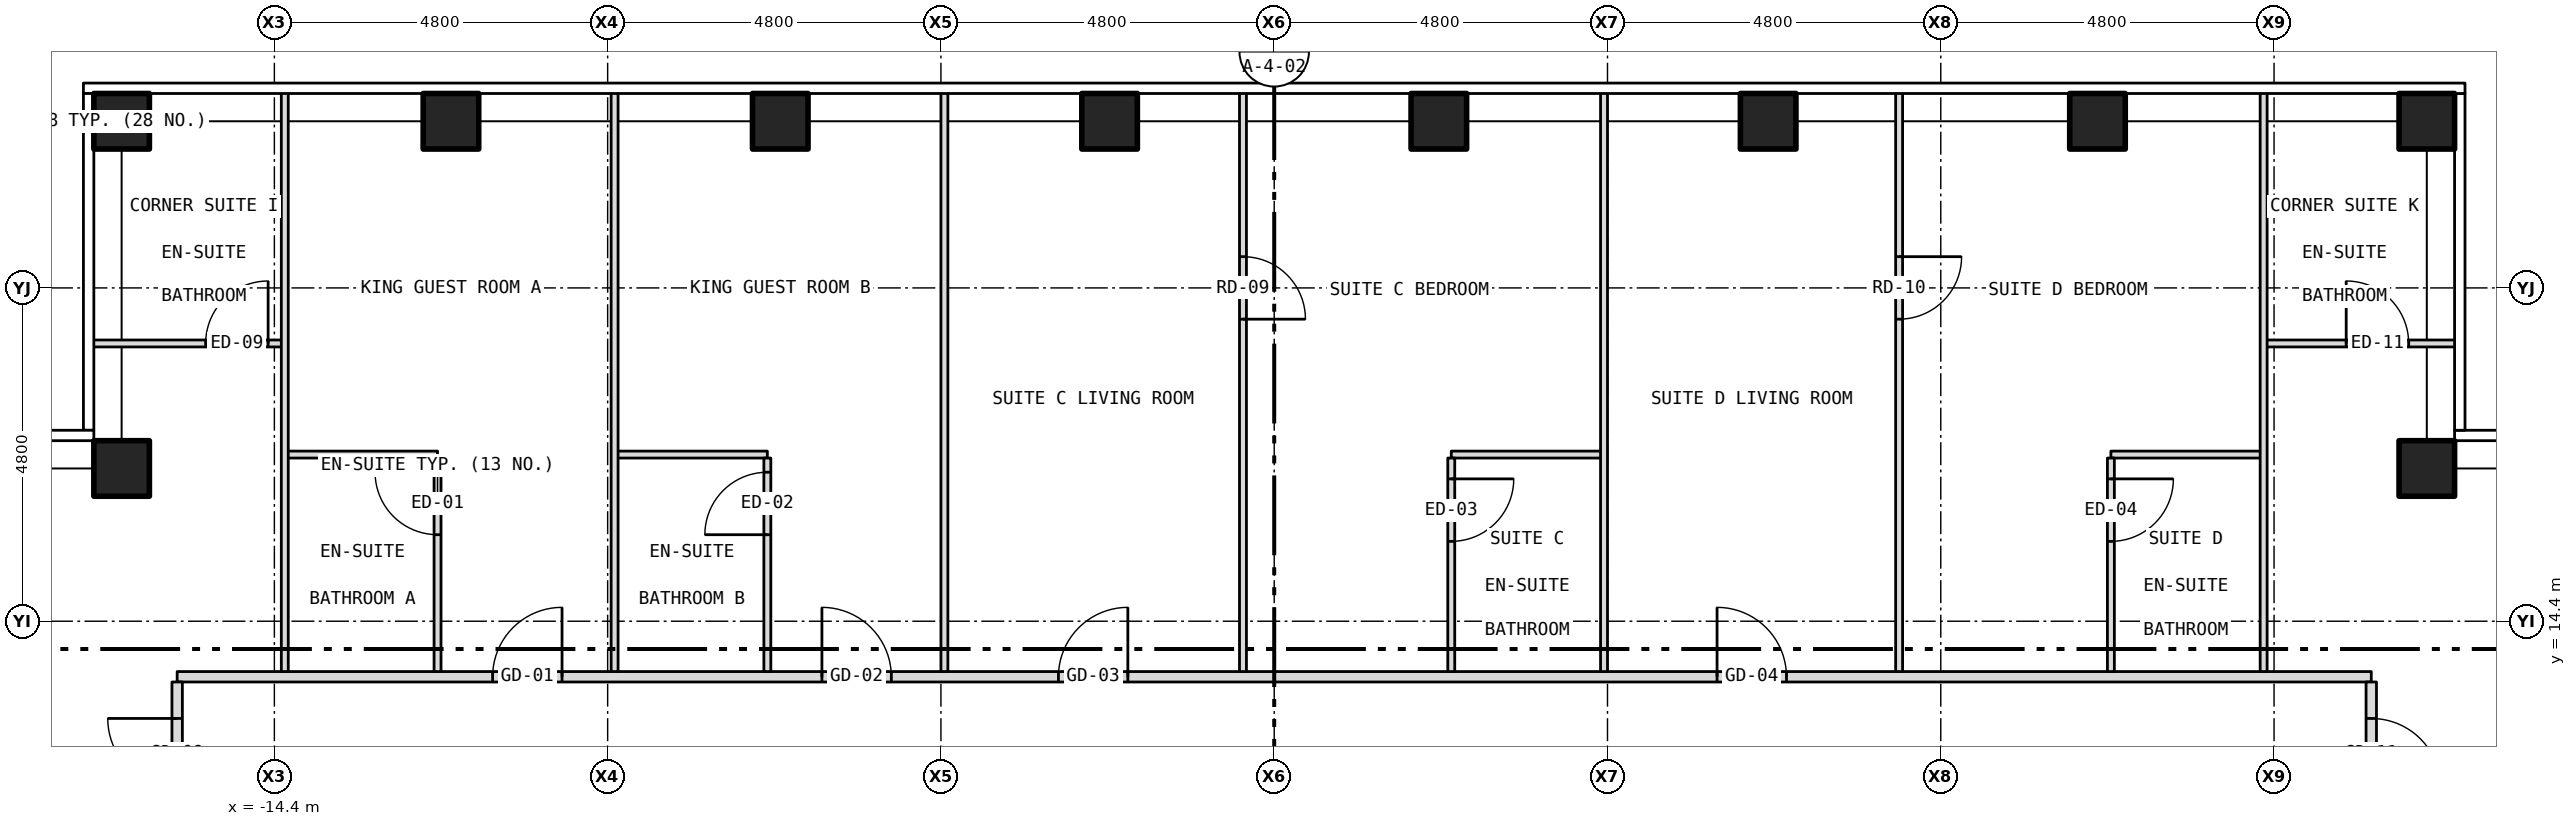
"""IFC4 building model, lengths in metres.
Left out: names, types, materials, properties, quantities, classifications, styles, units other than length and angle.
Written with IfcOpenShell. Run it as: python <this file> out.ifc"""

import sys

from ifc_helpers import new_model, si_unit, direction, frame, frame_2d, origin, origin_2d, place, context, subcontext, project, spatial, rectangle, hollow_rectangle, extrude, element, fill, save


model = new_model("IFC4")
c1 = context("Model", 3, precision=1e-05, world=origin(), true_north=direction((0.0, 1.0)))
c2 = subcontext(c1, "Body", "Model", "MODEL_VIEW")
j1 = project(units=[si_unit("LENGTHUNIT", "METRE"), si_unit("PLANEANGLEUNIT", "RADIAN")], contexts=[c1])
p1 = place(None, origin())
s1 = spatial("IfcSite", under=j1, at=p1, CompositionType="ELEMENT")
p2 = place(p1, origin())
s2 = spatial("IfcBuilding", under=s1, at=p2, CompositionType="ELEMENT")
p3 = place(p2, frame((0.0, 0.0, 169.0)))
s3 = spatial("IfcBuildingStorey", under=s2, at=p3, CompositionType="ELEMENT", Elevation=169.0)
for number, where, z_axis, x_axis in (
    (1, (-16.6, 21.6, -0.15), (0.0, 0.0, 1.0), (1.0, 0.0, 0.0)),
    (2, (-11.857, 21.6, -0.15), (0.0, 0.0, 1.0), (1.0, 0.0, 0.0)),
    (3, (-7.114, 21.6, -0.15), (0.0, 0.0, 1.0), (1.0, 0.0, 0.0)),
    (4, (-2.371, 21.6, -0.15), (0.0, 0.0, 1.0), (1.0, 0.0, 0.0)),
    (5, (2.371, 21.6, -0.15), (0.0, 0.0, 1.0), (1.0, 0.0, 0.0)),
    (6, (7.114, 21.6, -0.15), (0.0, 0.0, 1.0), (1.0, 0.0, 0.0)),
    (7, (11.857, 21.6, -0.15), (0.0, 0.0, 1.0), (1.0, 0.0, 0.0)),
    (8, (16.6, 21.6, -0.15), (0.0, 0.0, 1.0), (1.0, 0.0, 0.0)),
    (9, (-16.6, 16.6, -0.15), (0.0, 0.0, 1.0), (1.0, 0.0, 0.0)),
    (10, (16.6, 16.6, -0.15), (0.0, 0.0, 1.0), (1.0, 0.0, 0.0)),
):
    element("IfcColumn", number, at=place(p3, frame(where, z_axis=z_axis, x_axis=x_axis)), inside=s3, PredefinedType="COLUMN", context=c2, shape_type="SweptSolid", body=[
        extrude(hollow_rectangle(XDim=0.8, YDim=0.8, WallThickness=0.045, at=origin_2d()), origin(), (0.0, 0.0, 1.0), 3.5),
    ])
p4 = place(p3, frame((-15.8, 13.6, 0.0), z_axis=(0.0, 0.0, 1.0), x_axis=(1.0, 0.0, 0.0)))
e11 = element("IfcWall", 11, at=p4, inside=s3, PredefinedType="PARTITIONING", context=c2, shape_type="SweptSolid", body=[
    extrude(rectangle(XDim=31.6, YDim=0.15, at=frame_2d((15.8, 0.0))), origin(), (0.0, 0.0, 1.0), 3.35),
])
p5 = place(p4, frame((4.543, 0.0, 0.0)))
e12 = element("IfcOpeningElement", 12, at=p5, cuts=e11, PredefinedType="OPENING", context=c2, shape_type="SweptSolid", body=[
    extrude(rectangle(XDim=1.0, YDim=2.1, at=frame_2d((0.5, 1.05))), frame((0.0, 0.087, 0.0), z_axis=(0.0, -1.0, 0.0), x_axis=(1.0, 0.0, 0.0)), (0.0, 0.0, 1.0), 0.174),
])
p6 = place(p4, frame((9.286, 0.0, 0.0)))
e13 = element("IfcOpeningElement", 13, at=p6, cuts=e11, PredefinedType="OPENING", context=c2, shape_type="SweptSolid", body=[
    extrude(rectangle(XDim=1.0, YDim=2.1, at=frame_2d((0.5, 1.05))), frame((0.0, 0.087, 0.0), z_axis=(0.0, -1.0, 0.0), x_axis=(1.0, 0.0, 0.0)), (0.0, 0.0, 1.0), 0.174),
])
p7 = place(p4, frame((12.692, 0.0, 0.0)))
e14 = element("IfcOpeningElement", 14, at=p7, cuts=e11, PredefinedType="OPENING", context=c2, shape_type="SweptSolid", body=[
    extrude(rectangle(XDim=1.0, YDim=2.1, at=frame_2d((0.5, 1.05))), frame((0.0, 0.087, 0.0), z_axis=(0.0, -1.0, 0.0), x_axis=(1.0, 0.0, 0.0)), (0.0, 0.0, 1.0), 0.174),
])
p8 = place(p4, frame((22.178, 0.0, 0.0)))
e15 = element("IfcOpeningElement", 15, at=p8, cuts=e11, PredefinedType="OPENING", context=c2, shape_type="SweptSolid", body=[
    extrude(rectangle(XDim=1.0, YDim=2.1, at=frame_2d((0.5, 1.05))), frame((0.0, 0.087, 0.0), z_axis=(0.0, -1.0, 0.0), x_axis=(1.0, 0.0, 0.0)), (0.0, 0.0, 1.0), 0.174),
])
for number, where, z_axis, x_axis in (
    (16, (-14.25, 16.8, 0.0), (0.0, 0.0, 1.0), (1.0, 0.0, 0.0)),
    (17, (-9.5, 16.8, 0.0), (0.0, 0.0, 1.0), (1.0, 0.0, 0.0)),
    (18, (2.55, 16.8, 0.0), (0.0, 0.0, 1.0), (1.0, 0.0, 0.0)),
    (19, (12.05, 16.8, 0.0), (0.0, 0.0, 1.0), (1.0, 0.0, 0.0)),
):
    element("IfcWall", number, at=place(p3, frame(where, z_axis=z_axis, x_axis=x_axis)), inside=s3, PredefinedType="PARTITIONING", context=c2, shape_type="SweptSolid", body=[
        extrude(rectangle(XDim=2.2, YDim=0.1, at=frame_2d((1.1, 0.0))), origin(), (0.0, 0.0, 1.0), 3.35),
    ])
p9 = place(p3, frame((-17.03, 18.4, 0.0), z_axis=(0.0, 0.0, 1.0), x_axis=(1.0, 0.0, 0.0)))
e20 = element("IfcWall", 20, at=p9, inside=s3, PredefinedType="PARTITIONING", context=c2, shape_type="SweptSolid", body=[
    extrude(rectangle(XDim=2.78, YDim=0.1, at=frame_2d((1.39, 0.0))), origin(), (0.0, 0.0, 1.0), 3.35),
])
p10 = place(p9, frame((1.64, 0.0, 0.0)))
e21 = element("IfcOpeningElement", 21, at=p10, cuts=e20, PredefinedType="OPENING", context=c2, shape_type="SweptSolid", body=[
    extrude(rectangle(XDim=0.9, YDim=2.1, at=frame_2d((0.45, 1.05))), frame((0.0, 0.062, 0.0), z_axis=(0.0, -1.0, 0.0), x_axis=(1.0, 0.0, 0.0)), (0.0, 0.0, 1.0), 0.124),
])
p11 = place(p3, frame((14.25, 18.4, 0.0), z_axis=(0.0, 0.0, 1.0), x_axis=(1.0, 0.0, 0.0)))
e22 = element("IfcWall", 22, at=p11, inside=s3, PredefinedType="PARTITIONING", context=c2, shape_type="SweptSolid", body=[
    extrude(rectangle(XDim=2.78, YDim=0.1, at=frame_2d((1.39, 0.0))), origin(), (0.0, 0.0, 1.0), 3.35),
])
p12 = place(p11, frame((1.189, 0.0, 0.0)))
e23 = element("IfcOpeningElement", 23, at=p12, cuts=e22, PredefinedType="OPENING", context=c2, shape_type="SweptSolid", body=[
    extrude(rectangle(XDim=0.9, YDim=2.1, at=frame_2d((0.45, 1.05))), frame((0.0, 0.062, 0.0), z_axis=(0.0, -1.0, 0.0), x_axis=(1.0, 0.0, 0.0)), (0.0, 0.0, 1.0), 0.124),
])
p13 = place(p3, frame((-15.8, 10.92, 0.0), z_axis=(0.0, 0.0, 1.0), x_axis=(0.0, 1.0, 0.0)))
e24 = element("IfcWall", 24, at=p13, inside=s3, PredefinedType="PARTITIONING", context=c2, shape_type="SweptSolid", body=[
    extrude(rectangle(XDim=2.605, YDim=0.15, at=frame_2d((1.302, 0.0))), origin(), (0.0, 0.0, 1.0), 3.35),
])
p14 = place(p13, frame((1.08, 0.0, 0.0)))
e25 = element("IfcOpeningElement", 25, at=p14, cuts=e24, PredefinedType="OPENING", context=c2, shape_type="SweptSolid", body=[
    extrude(rectangle(XDim=1.0, YDim=2.1, at=frame_2d((0.5, 1.05))), frame((0.0, 0.087, 0.0), z_axis=(0.0, -1.0, 0.0), x_axis=(1.0, 0.0, 0.0)), (0.0, 0.0, 1.0), 0.174),
])
p15 = place(p3, frame((-14.25, 13.675, 0.0), z_axis=(0.0, 0.0, 1.0), x_axis=(0.0, 1.0, 0.0)))
e26 = element("IfcWall", 26, at=p15, inside=s3, PredefinedType="PARTITIONING", context=c2, shape_type="SweptSolid", body=[
    extrude(rectangle(XDim=8.355, YDim=0.1, at=frame_2d((4.177, 0.0))), origin(), (0.0, 0.0, 1.0), 2.817),
])
p16 = place(p3, frame((-12.05, 13.675, 0.0), z_axis=(0.0, 0.0, 1.0), x_axis=(0.0, 1.0, 0.0)))
e27 = element("IfcWall", 27, at=p16, inside=s3, PredefinedType="PARTITIONING", context=c2, shape_type="SweptSolid", body=[
    extrude(rectangle(XDim=3.075, YDim=0.1, at=frame_2d((1.538, 0.0))), origin(), (0.0, 0.0, 1.0), 3.35),
])
p17 = place(p16, frame((1.971, 0.0, 0.0)))
e28 = element("IfcOpeningElement", 28, at=p17, cuts=e27, PredefinedType="OPENING", context=c2, shape_type="SweptSolid", body=[
    extrude(rectangle(XDim=0.9, YDim=2.1, at=frame_2d((0.45, 1.05))), frame((0.0, 0.062, 0.0), z_axis=(0.0, -1.0, 0.0), x_axis=(1.0, 0.0, 0.0)), (0.0, 0.0, 1.0), 0.124),
])
p18 = place(p3, frame((-9.5, 13.675, 0.0), z_axis=(0.0, 0.0, 1.0), x_axis=(0.0, 1.0, 0.0)))
e29 = element("IfcWall", 29, at=p18, inside=s3, PredefinedType="PARTITIONING", context=c2, shape_type="SweptSolid", body=[
    extrude(rectangle(XDim=8.355, YDim=0.1, at=frame_2d((4.177, 0.0))), origin(), (0.0, 0.0, 1.0), 2.728),
])
p19 = place(p3, frame((-7.3, 13.675, 0.0), z_axis=(0.0, 0.0, 1.0), x_axis=(0.0, 1.0, 0.0)))
e30 = element("IfcWall", 30, at=p19, inside=s3, PredefinedType="PARTITIONING", context=c2, shape_type="SweptSolid", body=[
    extrude(rectangle(XDim=3.075, YDim=0.1, at=frame_2d((1.538, 0.0))), origin(), (0.0, 0.0, 1.0), 3.35),
])
p20 = place(p19, frame((1.971, 0.0, 0.0)))
e31 = element("IfcOpeningElement", 31, at=p20, cuts=e30, PredefinedType="OPENING", context=c2, shape_type="SweptSolid", body=[
    extrude(rectangle(XDim=0.9, YDim=2.1, at=frame_2d((0.45, 1.05))), frame((0.0, 0.062, 0.0), z_axis=(0.0, -1.0, 0.0), x_axis=(1.0, 0.0, 0.0)), (0.0, 0.0, 1.0), 0.124),
])
p21 = place(p3, frame((-4.75, 13.675, 0.0), z_axis=(0.0, 0.0, 1.0), x_axis=(0.0, 1.0, 0.0)))
e32 = element("IfcWall", 32, at=p21, inside=s3, PredefinedType="PARTITIONING", context=c2, shape_type="SweptSolid", body=[
    extrude(rectangle(XDim=8.355, YDim=0.1, at=frame_2d((4.177, 0.0))), origin(), (0.0, 0.0, 1.0), 2.817),
])
p22 = place(p3, frame((-0.45, 13.675, 0.0), z_axis=(0.0, 0.0, 1.0), x_axis=(0.0, 1.0, 0.0)))
e33 = element("IfcWall", 33, at=p22, inside=s3, PredefinedType="PARTITIONING", context=c2, shape_type="SweptSolid", body=[
    extrude(rectangle(XDim=8.355, YDim=0.1, at=frame_2d((4.177, 0.0))), origin(), (0.0, 0.0, 1.0), 3.35),
])
p23 = place(p22, frame((5.075, 0.0, 0.0)))
e34 = element("IfcOpeningElement", 34, at=p23, cuts=e33, PredefinedType="OPENING", context=c2, shape_type="SweptSolid", body=[
    extrude(rectangle(XDim=0.9, YDim=2.1, at=frame_2d((0.45, 1.05))), frame((0.0, 0.062, 0.0), z_axis=(0.0, -1.0, 0.0), x_axis=(1.0, 0.0, 0.0)), (0.0, 0.0, 1.0), 0.124),
])
p24 = place(p3, frame((2.55, 13.675, 0.0), z_axis=(0.0, 0.0, 1.0), x_axis=(0.0, 1.0, 0.0)))
e35 = element("IfcWall", 35, at=p24, inside=s3, PredefinedType="PARTITIONING", context=c2, shape_type="SweptSolid", body=[
    extrude(rectangle(XDim=3.075, YDim=0.1, at=frame_2d((1.538, 0.0))), origin(), (0.0, 0.0, 1.0), 3.35),
])
p25 = place(p24, frame((1.875, 0.0, 0.0)))
e36 = element("IfcOpeningElement", 36, at=p25, cuts=e35, PredefinedType="OPENING", context=c2, shape_type="SweptSolid", body=[
    extrude(rectangle(XDim=0.9, YDim=2.1, at=frame_2d((0.45, 1.05))), frame((0.0, 0.062, 0.0), z_axis=(0.0, -1.0, 0.0), x_axis=(1.0, 0.0, 0.0)), (0.0, 0.0, 1.0), 0.124),
])
p26 = place(p3, frame((4.75, 13.675, 0.0), z_axis=(0.0, 0.0, 1.0), x_axis=(0.0, 1.0, 0.0)))
e37 = element("IfcWall", 37, at=p26, inside=s3, PredefinedType="PARTITIONING", context=c2, shape_type="SweptSolid", body=[
    extrude(rectangle(XDim=8.355, YDim=0.1, at=frame_2d((4.177, 0.0))), origin(), (0.0, 0.0, 1.0), 2.817),
])
p27 = place(p3, frame((9.0, 13.675, 0.0), z_axis=(0.0, 0.0, 1.0), x_axis=(0.0, 1.0, 0.0)))
e38 = element("IfcWall", 38, at=p27, inside=s3, PredefinedType="PARTITIONING", context=c2, shape_type="SweptSolid", body=[
    extrude(rectangle(XDim=8.355, YDim=0.1, at=frame_2d((4.177, 0.0))), origin(), (0.0, 0.0, 1.0), 3.35),
])
p28 = place(p27, frame((5.075, 0.0, 0.0)))
e39 = element("IfcOpeningElement", 39, at=p28, cuts=e38, PredefinedType="OPENING", context=c2, shape_type="SweptSolid", body=[
    extrude(rectangle(XDim=0.9, YDim=2.1, at=frame_2d((0.45, 1.05))), frame((0.0, 0.062, 0.0), z_axis=(0.0, -1.0, 0.0), x_axis=(1.0, 0.0, 0.0)), (0.0, 0.0, 1.0), 0.124),
])
p29 = place(p3, frame((12.05, 13.675, 0.0), z_axis=(0.0, 0.0, 1.0), x_axis=(0.0, 1.0, 0.0)))
e40 = element("IfcWall", 40, at=p29, inside=s3, PredefinedType="PARTITIONING", context=c2, shape_type="SweptSolid", body=[
    extrude(rectangle(XDim=3.075, YDim=0.1, at=frame_2d((1.538, 0.0))), origin(), (0.0, 0.0, 1.0), 3.35),
])
p30 = place(p29, frame((1.875, 0.0, 0.0)))
e41 = element("IfcOpeningElement", 41, at=p30, cuts=e40, PredefinedType="OPENING", context=c2, shape_type="SweptSolid", body=[
    extrude(rectangle(XDim=0.9, YDim=2.1, at=frame_2d((0.45, 1.05))), frame((0.0, 0.062, 0.0), z_axis=(0.0, -1.0, 0.0), x_axis=(1.0, 0.0, 0.0)), (0.0, 0.0, 1.0), 0.124),
])
p31 = place(p3, frame((14.25, 13.675, 0.0), z_axis=(0.0, 0.0, 1.0), x_axis=(0.0, 1.0, 0.0)))
e42 = element("IfcWall", 42, at=p31, inside=s3, PredefinedType="PARTITIONING", context=c2, shape_type="SweptSolid", body=[
    extrude(rectangle(XDim=8.355, YDim=0.1, at=frame_2d((4.177, 0.0))), origin(), (0.0, 0.0, 1.0), 2.817),
])
p32 = place(p3, frame((15.8, 10.92, 0.0), z_axis=(0.0, 0.0, 1.0), x_axis=(0.0, 1.0, 0.0)))
e43 = element("IfcWall", 43, at=p32, inside=s3, PredefinedType="PARTITIONING", context=c2, shape_type="SweptSolid", body=[
    extrude(rectangle(XDim=2.605, YDim=0.15, at=frame_2d((1.302, 0.0))), origin(), (0.0, 0.0, 1.0), 3.35),
])
p33 = place(p32, frame((1.08, 0.0, 0.0)))
e44 = element("IfcOpeningElement", 44, at=p33, cuts=e43, PredefinedType="OPENING", context=c2, shape_type="SweptSolid", body=[
    extrude(rectangle(XDim=1.0, YDim=2.1, at=frame_2d((0.5, 1.05))), frame((0.0, 0.087, 0.0), z_axis=(0.0, -1.0, 0.0), x_axis=(1.0, 0.0, 0.0)), (0.0, 0.0, 1.0), 0.174),
])
p34 = place(p5, origin())
e45 = element("IfcDoor", 45, at=p34, inside=s3, OperationType="SINGLE_SWING_RIGHT", PredefinedType="DOOR", context=c2, shape_type="SweptSolid", body=[
    extrude(rectangle(XDim=1.0, YDim=2.1, at=frame_2d((0.5, 1.05))), frame((0.0, 0.025, 0.0), z_axis=(0.0, -1.0, 0.0), x_axis=(1.0, 0.0, 0.0)), (0.0, 0.0, 1.0), 0.05),
])
fill(e12, e45)
p35 = place(p17, origin())
e46 = element("IfcDoor", 46, at=p35, inside=s3, OperationType="SINGLE_SWING_RIGHT", PredefinedType="DOOR", context=c2, shape_type="SweptSolid", body=[
    extrude(rectangle(XDim=0.9, YDim=2.1, at=frame_2d((0.45, 1.05))), frame((0.0, 0.025, 0.0), z_axis=(0.0, -1.0, 0.0), x_axis=(1.0, 0.0, 0.0)), (0.0, 0.0, 1.0), 0.05),
])
fill(e28, e46)
p36 = place(p6, origin())
e47 = element("IfcDoor", 47, at=p36, inside=s3, OperationType="SINGLE_SWING_LEFT", PredefinedType="DOOR", context=c2, shape_type="SweptSolid", body=[
    extrude(rectangle(XDim=1.0, YDim=2.1, at=frame_2d((0.5, 1.05))), frame((0.0, 0.025, 0.0), z_axis=(0.0, -1.0, 0.0), x_axis=(1.0, 0.0, 0.0)), (0.0, 0.0, 1.0), 0.05),
])
fill(e13, e47)
p37 = place(p20, origin())
e48 = element("IfcDoor", 48, at=p37, inside=s3, OperationType="SINGLE_SWING_LEFT", PredefinedType="DOOR", context=c2, shape_type="SweptSolid", body=[
    extrude(rectangle(XDim=0.9, YDim=2.1, at=frame_2d((0.45, 1.05))), frame((0.0, 0.025, 0.0), z_axis=(0.0, -1.0, 0.0), x_axis=(1.0, 0.0, 0.0)), (0.0, 0.0, 1.0), 0.05),
])
fill(e31, e48)
p38 = place(p7, origin())
e49 = element("IfcDoor", 49, at=p38, inside=s3, OperationType="SINGLE_SWING_RIGHT", PredefinedType="DOOR", context=c2, shape_type="SweptSolid", body=[
    extrude(rectangle(XDim=1.0, YDim=2.1, at=frame_2d((0.5, 1.05))), frame((0.0, 0.025, 0.0), z_axis=(0.0, -1.0, 0.0), x_axis=(1.0, 0.0, 0.0)), (0.0, 0.0, 1.0), 0.05),
])
fill(e14, e49)
p39 = place(p23, origin())
e50 = element("IfcDoor", 50, at=p39, inside=s3, OperationType="SINGLE_SWING_LEFT", PredefinedType="DOOR", context=c2, shape_type="SweptSolid", body=[
    extrude(rectangle(XDim=0.9, YDim=2.1, at=frame_2d((0.45, 1.05))), frame((0.0, 0.025, 0.0), z_axis=(0.0, -1.0, 0.0), x_axis=(1.0, 0.0, 0.0)), (0.0, 0.0, 1.0), 0.05),
])
fill(e34, e50)
p40 = place(p25, origin())
e51 = element("IfcDoor", 51, at=p40, inside=s3, OperationType="SINGLE_SWING_RIGHT", PredefinedType="DOOR", context=c2, shape_type="SweptSolid", body=[
    extrude(rectangle(XDim=0.9, YDim=2.1, at=frame_2d((0.45, 1.05))), frame((0.0, 0.025, 0.0), z_axis=(0.0, -1.0, 0.0), x_axis=(1.0, 0.0, 0.0)), (0.0, 0.0, 1.0), 0.05),
])
fill(e36, e51)
p41 = place(p8, origin())
e52 = element("IfcDoor", 52, at=p41, inside=s3, OperationType="SINGLE_SWING_LEFT", PredefinedType="DOOR", context=c2, shape_type="SweptSolid", body=[
    extrude(rectangle(XDim=1.0, YDim=2.1, at=frame_2d((0.5, 1.05))), frame((0.0, 0.025, 0.0), z_axis=(0.0, -1.0, 0.0), x_axis=(1.0, 0.0, 0.0)), (0.0, 0.0, 1.0), 0.05),
])
fill(e15, e52)
p42 = place(p28, origin())
e53 = element("IfcDoor", 53, at=p42, inside=s3, OperationType="SINGLE_SWING_RIGHT", PredefinedType="DOOR", context=c2, shape_type="SweptSolid", body=[
    extrude(rectangle(XDim=0.9, YDim=2.1, at=frame_2d((0.45, 1.05))), frame((0.0, 0.025, 0.0), z_axis=(0.0, -1.0, 0.0), x_axis=(1.0, 0.0, 0.0)), (0.0, 0.0, 1.0), 0.05),
])
fill(e39, e53)
p43 = place(p30, origin())
e54 = element("IfcDoor", 54, at=p43, inside=s3, OperationType="SINGLE_SWING_RIGHT", PredefinedType="DOOR", context=c2, shape_type="SweptSolid", body=[
    extrude(rectangle(XDim=0.9, YDim=2.1, at=frame_2d((0.45, 1.05))), frame((0.0, 0.025, 0.0), z_axis=(0.0, -1.0, 0.0), x_axis=(1.0, 0.0, 0.0)), (0.0, 0.0, 1.0), 0.05),
])
fill(e41, e54)
p44 = place(p10, origin())
e55 = element("IfcDoor", 55, at=p44, inside=s3, OperationType="SINGLE_SWING_RIGHT", PredefinedType="DOOR", context=c2, shape_type="SweptSolid", body=[
    extrude(rectangle(XDim=0.9, YDim=2.1, at=frame_2d((0.45, 1.05))), frame((0.0, 0.025, 0.0), z_axis=(0.0, -1.0, 0.0), x_axis=(1.0, 0.0, 0.0)), (0.0, 0.0, 1.0), 0.05),
])
fill(e21, e55)
p45 = place(p14, origin())
e56 = element("IfcDoor", 56, at=p45, inside=s3, OperationType="SINGLE_SWING_RIGHT", PredefinedType="DOOR", context=c2, shape_type="SweptSolid", body=[
    extrude(rectangle(XDim=1.0, YDim=2.1, at=frame_2d((0.5, 1.05))), frame((0.0, 0.025, 0.0), z_axis=(0.0, -1.0, 0.0), x_axis=(1.0, 0.0, 0.0)), (0.0, 0.0, 1.0), 0.05),
])
fill(e25, e56)
p46 = place(p12, origin())
e57 = element("IfcDoor", 57, at=p46, inside=s3, OperationType="SINGLE_SWING_LEFT", PredefinedType="DOOR", context=c2, shape_type="SweptSolid", body=[
    extrude(rectangle(XDim=0.9, YDim=2.1, at=frame_2d((0.45, 1.05))), frame((0.0, 0.025, 0.0), z_axis=(0.0, -1.0, 0.0), x_axis=(1.0, 0.0, 0.0)), (0.0, 0.0, 1.0), 0.05),
])
fill(e23, e57)
p47 = place(p33, origin())
e58 = element("IfcDoor", 58, at=p47, inside=s3, OperationType="SINGLE_SWING_LEFT", PredefinedType="DOOR", context=c2, shape_type="SweptSolid", body=[
    extrude(rectangle(XDim=1.0, YDim=2.1, at=frame_2d((0.5, 1.05))), frame((0.0, 0.025, 0.0), z_axis=(0.0, -1.0, 0.0), x_axis=(1.0, 0.0, 0.0)), (0.0, 0.0, 1.0), 0.05),
])
fill(e44, e58)
save(model, sys.argv[1])
